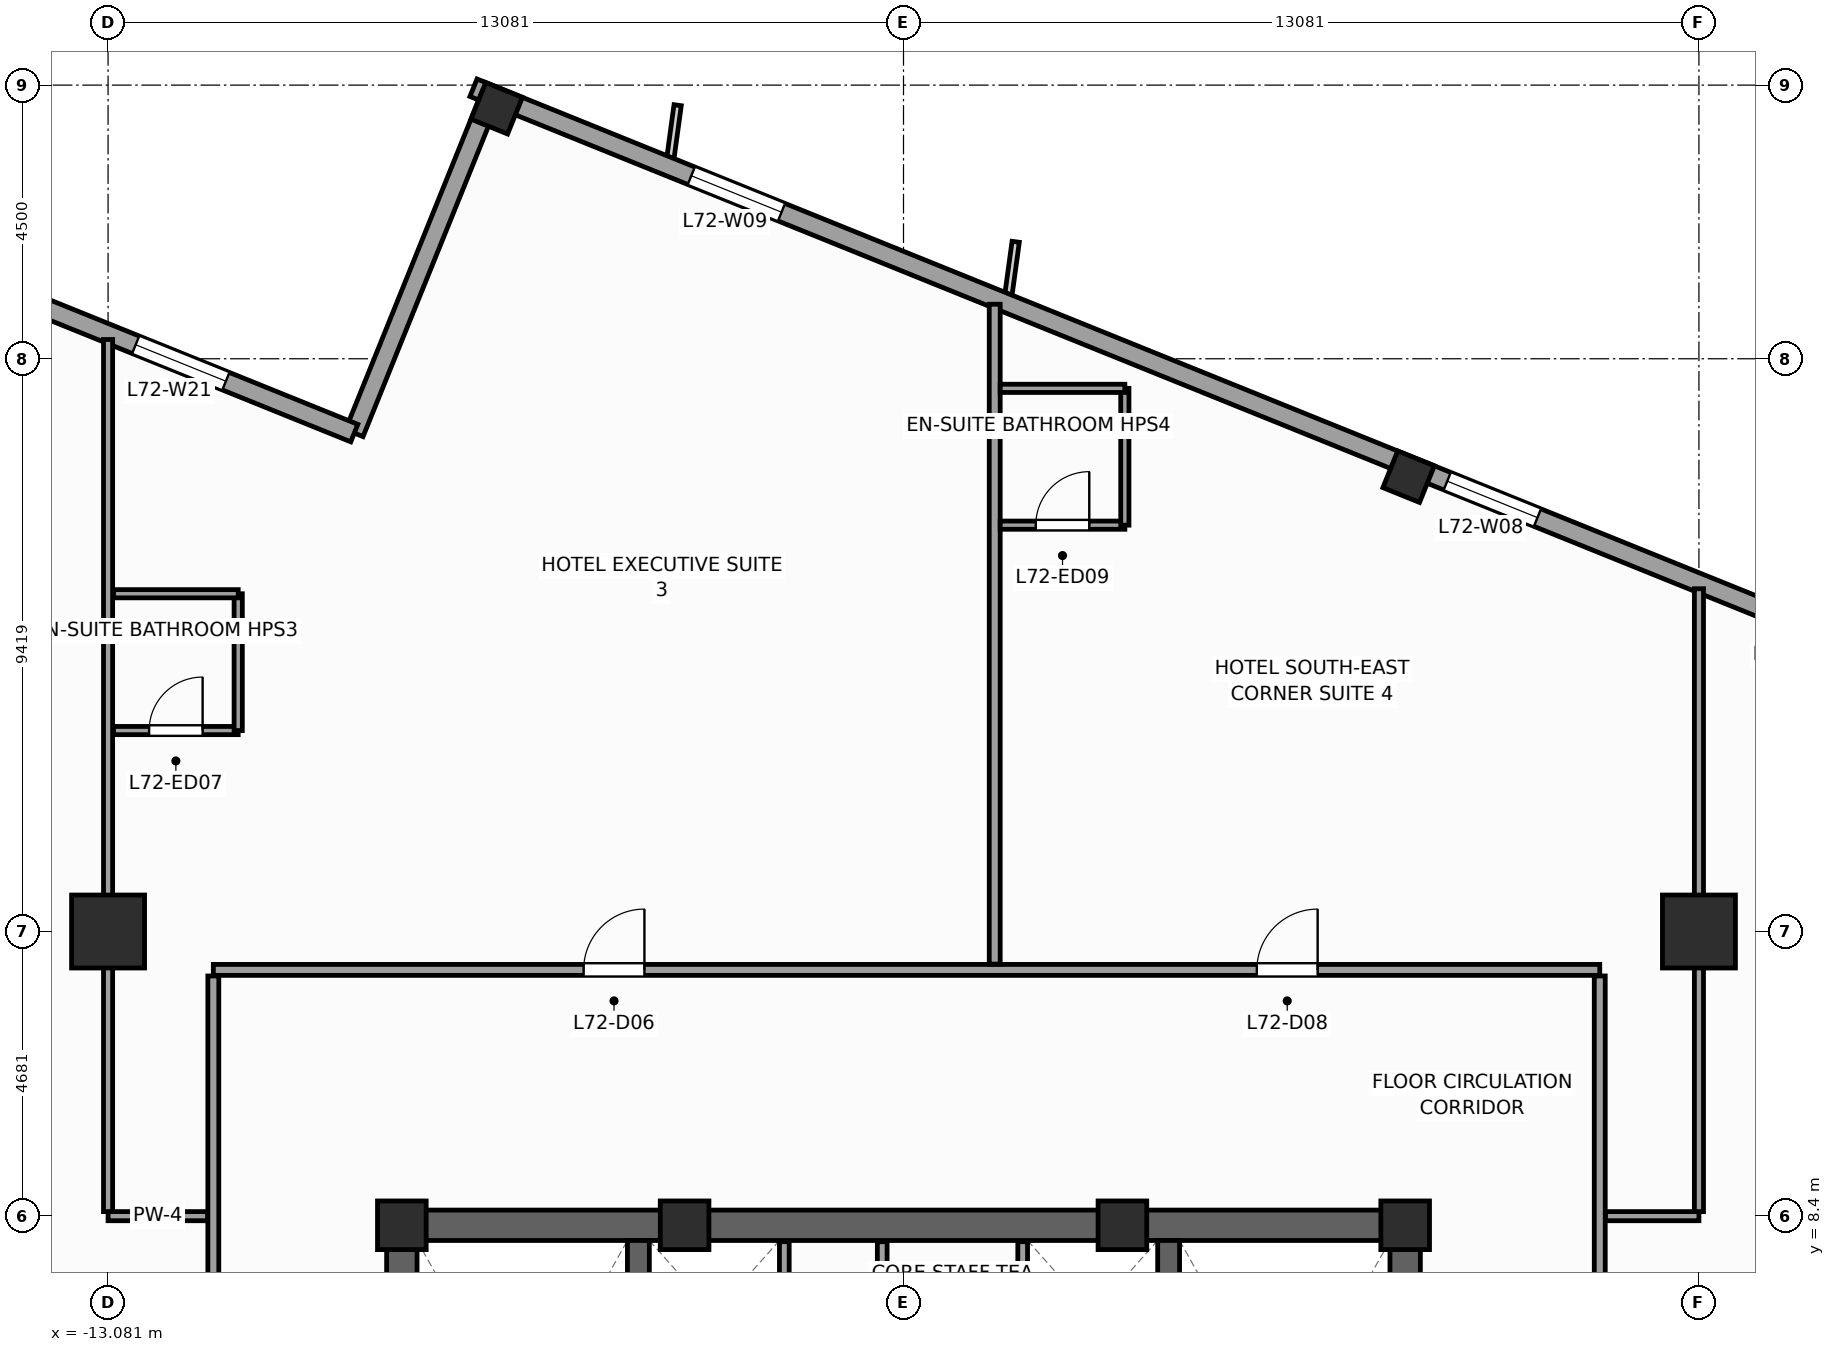
"""IFC4 building model, lengths in metres.
Left out: names, types, materials, properties, quantities, classifications, styles, units other than length and angle.
Written with IfcOpenShell. Run it as: python <this file> out.ifc"""

import sys

from ifc_helpers import new_model, si_unit, direction, frame, frame_2d, origin, origin_2d, place, context, subcontext, project, spatial, rectangle, extrude, source, transform, mapped, element, fill, save


model = new_model("IFC4")
c1 = context("Model", 3, precision=1e-05, world=origin(), true_north=direction((0.0, 1.0)))
c2 = subcontext(c1, "Body", "Model", "MODEL_VIEW")
j1 = project(units=[si_unit("LENGTHUNIT", "METRE"), si_unit("PLANEANGLEUNIT", "RADIAN")], contexts=[c1])
p1 = place(None, origin())
s1 = spatial("IfcSite", under=j1, at=p1, CompositionType="ELEMENT")
p2 = place(p1, origin())
s2 = spatial("IfcBuilding", under=s1, at=p2, CompositionType="ELEMENT")
p3 = place(p2, frame((0.0, 0.0, 294.0)))
s3 = spatial("IfcBuildingStorey", under=s2, at=p3, CompositionType="ELEMENT", Elevation=294.0)
p4 = place(p3, frame((-8.5, 8.25, 0.0), z_axis=(0.0, 0.0, 1.0), x_axis=(1.0, 0.0, 0.0)))
e1 = element("IfcWall", 1, at=p4, inside=s3, PredefinedType="SHEAR", context=c2, shape_type="SweptSolid", body=[
    extrude(rectangle(XDim=17.0, YDim=0.5, at=frame_2d((8.5, 0.0))), origin(), (0.0, 0.0, 1.0), 3.6),
])
p5 = place(p3, frame((-8.25, -8.0, 0.0), z_axis=(0.0, 0.0, 1.0), x_axis=(0.0, 1.0, 0.0)))
e2 = element("IfcWall", 2, at=p5, inside=s3, PredefinedType="SHEAR", context=c2, shape_type="SweptSolid", body=[
    extrude(rectangle(XDim=16.0, YDim=0.5, at=frame_2d((8.0, 0.0))), origin(), (0.0, 0.0, 1.0), 3.6),
])
p6 = place(p5, frame((4.69, 0.0, 0.0)))
e3 = element("IfcOpeningElement", 3, at=p6, cuts=e2, PredefinedType="OPENING", context=c2, shape_type="SweptSolid", body=[
    extrude(rectangle(XDim=1.3, YDim=2.2, at=frame_2d((0.65, 1.1))), frame((0.0, 0.26, 0.0), z_axis=(0.0, -1.0, 0.0), x_axis=(1.0, 0.0, 0.0)), (0.0, 0.0, 1.0), 0.52),
])
p7 = place(p3, frame((8.25, -8.0, 0.0), z_axis=(0.0, 0.0, 1.0), x_axis=(0.0, 1.0, 0.0)))
e4 = element("IfcWall", 4, at=p7, inside=s3, PredefinedType="SHEAR", context=c2, shape_type="SweptSolid", body=[
    extrude(rectangle(XDim=16.0, YDim=0.5, at=frame_2d((8.0, 0.0))), origin(), (0.0, 0.0, 1.0), 3.6),
])
p8 = place(p7, frame((4.69, 0.0, 0.0)))
e5 = element("IfcOpeningElement", 5, at=p8, cuts=e4, PredefinedType="OPENING", context=c2, shape_type="SweptSolid", body=[
    extrude(rectangle(XDim=1.3, YDim=2.2, at=frame_2d((0.65, 1.1))), frame((0.0, 0.26, 0.0), z_axis=(0.0, -1.0, 0.0), x_axis=(1.0, 0.0, 0.0)), (0.0, 0.0, 1.0), 0.52),
])
for number, where, z_axis, x_axis in (
    (6, (-4.36, -8.0, 0.0), (0.0, 0.0, 1.0), (0.0, 1.0, 0.0)),
    (7, (4.36, -8.0, 0.0), (0.0, 0.0, 1.0), (0.0, 1.0, 0.0)),
):
    element("IfcWall", number, at=place(p3, frame(where, z_axis=z_axis, x_axis=x_axis)), inside=s3, PredefinedType="SHEAR", context=c2, shape_type="SweptSolid", body=[
        extrude(rectangle(XDim=16.0, YDim=0.36, at=frame_2d((8.0, 0.0))), origin(), (0.0, 0.0, 1.0), 3.6),
    ])
m1 = source(origin(), c2, "Body", "SweptSolid", [
    extrude(rectangle(XDim=0.8, YDim=0.8, at=origin_2d()), origin(), (0.0, 0.0, 1.0), 3.6),
])
for number, where, z_axis, x_axis in (
    (8, (8.25, 8.25, 0.0), (0.0, 0.0, 1.0), (1.0, 0.0, 0.0)),
    (9, (-8.25, 8.25, 0.0), (0.0, 0.0, 1.0), (1.0, 0.0, 0.0)),
    (10, (-3.6, 8.25, 0.0), (0.0, 0.0, 1.0), (1.0, 0.0, 0.0)),
    (11, (3.6, 8.25, 0.0), (0.0, 0.0, 1.0), (1.0, 0.0, 0.0)),
):
    element("IfcColumn", number, at=place(p3, frame(where, z_axis=z_axis, x_axis=x_axis)), inside=s3, PredefinedType="PILASTER", context=c2, shape_type="MappedRepresentation", body=[
        mapped(m1, transform((0.0, 0.0, 0.0), scale=1.0)),
    ])
m2 = source(origin(), c2, "Body", "SweptSolid", [
    extrude(rectangle(XDim=1.2, YDim=1.2, at=origin_2d()), origin(), (0.0, 0.0, 1.0), 3.6),
])
for number, where, z_axis, x_axis in (
    (12, (13.081, 13.081, 0.0), (0.0, 0.0, 1.0), (1.0, 0.0, 0.0)),
    (13, (-13.081, 13.081, 0.0), (0.0, 0.0, 1.0), (1.0, 0.0, 0.0)),
):
    element("IfcColumn", number, at=place(p3, frame(where, z_axis=z_axis, x_axis=x_axis)), inside=s3, PredefinedType="COLUMN", context=c2, shape_type="MappedRepresentation", body=[
        mapped(m2, transform((0.0, 0.0, 0.0), scale=1.0)),
    ])
m3 = source(origin(), c2, "Body", "SweptSolid", [
    extrude(rectangle(XDim=0.65, YDim=0.65, at=origin_2d()), origin(), (0.0, 0.0, 1.0), 3.6),
])
for number, where, z_axis, x_axis in (
    (14, (8.307, 20.56, 0.0), (0.0, 0.0, 1.0), (0.375, 0.927, 0.0)),
    (15, (-6.69, 26.62, 0.0), (0.0, 0.0, 1.0), (0.375, 0.927, 0.0)),
):
    element("IfcColumn", number, at=place(p3, frame(where, z_axis=z_axis, x_axis=x_axis)), inside=s3, PredefinedType="COLUMN", context=c2, shape_type="MappedRepresentation", body=[
        mapped(m3, transform((0.0, 0.0, 0.0), scale=1.0)),
    ])
p9 = place(p3, frame((23.813, 14.479, 0.0), z_axis=(0.0, 0.0, 1.0), x_axis=(-0.927182657188, 0.374609557019, 0.0)))
e16 = element("IfcWall", 16, at=p9, inside=s3, PredefinedType="STANDARD", context=c2, shape_type="SweptSolid", body=[
    extrude(rectangle(XDim=33.31, YDim=0.31, at=frame_2d((16.655, 0.0))), origin(), (0.0, 0.0, 1.0), 2.75),
])
p10 = place(p9, frame((3.197, 0.0, 0.47)))
e17 = element("IfcOpeningElement", 17, at=p10, cuts=e16, PredefinedType="OPENING", context=c2, shape_type="SweptSolid", body=[
    extrude(rectangle(XDim=1.6, YDim=2.1, at=frame_2d((0.8, 1.05))), frame((0.0, 0.165, 0.0), z_axis=(0.0, -1.0, 0.0), x_axis=(1.0, 0.0, 0.0)), (0.0, 0.0, 1.0), 0.33),
])
p11 = place(p9, frame((8.86, 0.0, 0.47)))
e18 = element("IfcOpeningElement", 18, at=p11, cuts=e16, PredefinedType="OPENING", context=c2, shape_type="SweptSolid", body=[
    extrude(rectangle(XDim=1.6, YDim=2.1, at=frame_2d((0.8, 1.05))), frame((0.0, 0.165, 0.0), z_axis=(0.0, -1.0, 0.0), x_axis=(1.0, 0.0, 0.0)), (0.0, 0.0, 1.0), 0.33),
])
p12 = place(p9, frame((14.439, 0.0, 0.47)))
e19 = element("IfcOpeningElement", 19, at=p12, cuts=e16, PredefinedType="OPENING", context=c2, shape_type="SweptSolid", body=[
    extrude(rectangle(XDim=1.6, YDim=2.1, at=frame_2d((0.8, 1.05))), frame((0.0, 0.165, 0.0), z_axis=(0.0, -1.0, 0.0), x_axis=(1.0, 0.0, 0.0)), (0.0, 0.0, 1.0), 0.33),
])
p13 = place(p9, frame((27.847, 0.0, 0.47)))
e20 = element("IfcOpeningElement", 20, at=p13, cuts=e16, PredefinedType="OPENING", context=c2, shape_type="SweptSolid", body=[
    extrude(rectangle(XDim=1.6, YDim=2.1, at=frame_2d((0.8, 1.05))), frame((0.0, 0.165, 0.0), z_axis=(0.0, -1.0, 0.0), x_axis=(1.0, 0.0, 0.0)), (0.0, 0.0, 1.0), 0.33),
])
p14 = place(p3, frame((-6.784, 26.841, 0.0), z_axis=(0.0, 0.0, 1.0), x_axis=(-0.374636620962, -0.927171722085, 0.0)))
e21 = element("IfcWall", 21, at=p14, inside=s3, PredefinedType="STANDARD", context=c2, shape_type="SweptSolid", body=[
    extrude(rectangle(XDim=6.0, YDim=0.31, at=frame_2d((3.0, 0.0))), origin(), (0.0, 0.0, 1.0), 2.65),
])
p15 = place(p3, frame((-9.032, 21.278, 0.0), z_axis=(0.0, 0.0, 1.0), x_axis=(-0.927185411764, 0.374602739196, 0.0)))
e22 = element("IfcWall", 22, at=p15, inside=s3, PredefinedType="STANDARD", context=c2, shape_type="SweptSolid", body=[
    extrude(rectangle(XDim=6.155, YDim=0.31, at=frame_2d((3.078, 0.0))), origin(), (0.0, 0.0, 1.0), 3.35),
])
p16 = place(p15, frame((2.278, 0.0, 0.47)))
e23 = element("IfcOpeningElement", 23, at=p16, cuts=e22, PredefinedType="OPENING", context=c2, shape_type="SweptSolid", body=[
    extrude(rectangle(XDim=1.6, YDim=2.1, at=frame_2d((0.8, 1.05))), frame((0.0, 0.165, 0.0), z_axis=(0.0, -1.0, 0.0), x_axis=(1.0, 0.0, 0.0)), (0.0, 0.0, 1.0), 0.33),
])
for number, where, z_axis, x_axis in (
    (24, (-1.96, 4.58, 0.0), (0.0, 0.0, 1.0), (0.0, 1.0, 0.0)),
    (25, (1.96, 4.58, 0.0), (0.0, 0.0, 1.0), (0.0, 1.0, 0.0)),
):
    element("IfcWall", number, at=place(p3, frame(where, z_axis=z_axis, x_axis=x_axis)), inside=s3, PredefinedType="PARTITIONING", context=c2, shape_type="SweptSolid", body=[
        extrude(rectangle(XDim=3.4, YDim=0.16, at=frame_2d((1.7, 0.0))), origin(), (0.0, 0.0, 1.0), 3.35),
    ])
p17 = place(p3, frame((-0.35, 4.6, 0.0), z_axis=(0.0, 0.0, 1.0), x_axis=(0.0, 1.0, 0.0)))
e26 = element("IfcWall", 26, at=p17, inside=s3, PredefinedType="PARTITIONING", context=c2, shape_type="SweptSolid", body=[
    extrude(rectangle(XDim=3.38, YDim=0.16, at=frame_2d((1.69, 0.0))), origin(), (0.0, 0.0, 1.0), 3.35),
])
p18 = place(p3, frame((-11.35, 12.45, 0.0), z_axis=(0.0, 0.0, 1.0), x_axis=(1.0, 0.0, 0.0)))
e27 = element("IfcWall", 27, at=p18, inside=s3, PredefinedType="PARTITIONING", context=c2, shape_type="SweptSolid", body=[
    extrude(rectangle(XDim=22.8, YDim=0.18, at=frame_2d((11.4, 0.0))), origin(), (0.0, 0.0, 1.0), 3.35),
])
p19 = place(p18, frame((6.089, 0.0, 0.0)))
e28 = element("IfcOpeningElement", 28, at=p19, cuts=e27, PredefinedType="OPENING", context=c2, shape_type="SweptSolid", body=[
    extrude(rectangle(XDim=1.0, YDim=2.15, at=frame_2d((0.5, 1.075))), frame((0.0, 0.1, 0.0), z_axis=(0.0, -1.0, 0.0), x_axis=(1.0, 0.0, 0.0)), (0.0, 0.0, 1.0), 0.2),
])
p20 = place(p18, frame((17.161, 0.0, 0.0)))
e29 = element("IfcOpeningElement", 29, at=p20, cuts=e27, PredefinedType="OPENING", context=c2, shape_type="SweptSolid", body=[
    extrude(rectangle(XDim=1.0, YDim=2.15, at=frame_2d((0.5, 1.075))), frame((0.0, 0.1, 0.0), z_axis=(0.0, -1.0, 0.0), x_axis=(1.0, 0.0, 0.0)), (0.0, 0.0, 1.0), 0.2),
])
p21 = place(p3, frame((-11.35, -10.2, 0.0), z_axis=(0.0, 0.0, 1.0), x_axis=(0.0, 1.0, 0.0)))
e30 = element("IfcWall", 30, at=p21, inside=s3, PredefinedType="PARTITIONING", context=c2, shape_type="SweptSolid", body=[
    extrude(rectangle(XDim=22.55, YDim=0.18, at=frame_2d((11.275, 0.0))), origin(), (0.0, 0.0, 1.0), 3.35),
])
p22 = place(p21, frame((11.6, 0.0, 0.0)))
e31 = element("IfcOpeningElement", 31, at=p22, cuts=e30, PredefinedType="OPENING", context=c2, shape_type="SweptSolid", body=[
    extrude(rectangle(XDim=1.0, YDim=2.15, at=frame_2d((0.5, 1.075))), frame((0.0, 0.1, 0.0), z_axis=(0.0, -1.0, 0.0), x_axis=(1.0, 0.0, 0.0)), (0.0, 0.0, 1.0), 0.2),
])
p23 = place(p21, frame((15.8, 0.0, 0.0)))
e32 = element("IfcOpeningElement", 32, at=p23, cuts=e30, PredefinedType="OPENING", context=c2, shape_type="SweptSolid", body=[
    extrude(rectangle(XDim=1.0, YDim=2.15, at=frame_2d((0.5, 1.075))), frame((0.0, 0.1, 0.0), z_axis=(0.0, -1.0, 0.0), x_axis=(1.0, 0.0, 0.0)), (0.0, 0.0, 1.0), 0.2),
])
p24 = place(p21, frame((3.6, 0.0, 0.0)))
e33 = element("IfcOpeningElement", 33, at=p24, cuts=e30, PredefinedType="OPENING", context=c2, shape_type="SweptSolid", body=[
    extrude(rectangle(XDim=1.0, YDim=2.15, at=frame_2d((0.5, 1.075))), frame((0.0, 0.1, 0.0), z_axis=(0.0, -1.0, 0.0), x_axis=(1.0, 0.0, 0.0)), (0.0, 0.0, 1.0), 0.2),
])
p25 = place(p21, frame((7.8, 0.0, 0.0)))
e34 = element("IfcOpeningElement", 34, at=p25, cuts=e30, PredefinedType="OPENING", context=c2, shape_type="SweptSolid", body=[
    extrude(rectangle(XDim=1.0, YDim=2.15, at=frame_2d((0.5, 1.075))), frame((0.0, 0.1, 0.0), z_axis=(0.0, -1.0, 0.0), x_axis=(1.0, 0.0, 0.0)), (0.0, 0.0, 1.0), 0.2),
])
p26 = place(p3, frame((11.45, -10.2, 0.0), z_axis=(0.0, 0.0, 1.0), x_axis=(0.0, 1.0, 0.0)))
e35 = element("IfcWall", 35, at=p26, inside=s3, PredefinedType="PARTITIONING", context=c2, shape_type="SweptSolid", body=[
    extrude(rectangle(XDim=22.55, YDim=0.18, at=frame_2d((11.275, 0.0))), origin(), (0.0, 0.0, 1.0), 3.35),
])
p27 = place(p26, frame((13.9, 0.0, 0.0)))
e36 = element("IfcOpeningElement", 36, at=p27, cuts=e35, PredefinedType="OPENING", context=c2, shape_type="SweptSolid", body=[
    extrude(rectangle(XDim=1.0, YDim=2.15, at=frame_2d((0.5, 1.075))), frame((0.0, 0.1, 0.0), z_axis=(0.0, -1.0, 0.0), x_axis=(1.0, 0.0, 0.0)), (0.0, 0.0, 1.0), 0.2),
])
p28 = place(p26, frame((5.5, 0.0, 0.0)))
e37 = element("IfcOpeningElement", 37, at=p28, cuts=e35, PredefinedType="OPENING", context=c2, shape_type="SweptSolid", body=[
    extrude(rectangle(XDim=1.0, YDim=2.15, at=frame_2d((0.5, 1.075))), frame((0.0, 0.1, 0.0), z_axis=(0.0, -1.0, 0.0), x_axis=(1.0, 0.0, 0.0)), (0.0, 0.0, 1.0), 0.2),
])
p29 = place(p3, frame((1.5, 12.545, 0.0), z_axis=(0.0, 0.0, 1.0), x_axis=(0.0, 1.0, 0.0)))
e38 = element("IfcWall", 38, at=p29, inside=s3, PredefinedType="PARTITIONING", context=c2, shape_type="SweptSolid", body=[
    extrude(rectangle(XDim=10.852, YDim=0.18, at=frame_2d((5.426, 0.0))), origin(), (0.0, 0.0, 1.0), 3.35),
])
p30 = place(p3, frame((-11.445, 8.4, 0.0), z_axis=(0.0, 0.0, 1.0), x_axis=(-1.0, 0.0, 0.0)))
e39 = element("IfcWall", 39, at=p30, inside=s3, PredefinedType="PARTITIONING", context=c2, shape_type="SweptSolid", body=[
    extrude(rectangle(XDim=1.636, YDim=0.15, at=frame_2d((0.818, 0.0))), origin(), (0.0, 0.0, 1.0), 3.35),
])
p31 = place(p3, frame((-13.081, 8.475, 0.0), z_axis=(0.0, 0.0, 1.0), x_axis=(0.0, 1.0, 0.0)))
e40 = element("IfcWall", 40, at=p31, inside=s3, PredefinedType="PARTITIONING", context=c2, shape_type="SweptSolid", body=[
    extrude(rectangle(XDim=14.342, YDim=0.15, at=frame_2d((7.171, 0.0))), origin(), (0.0, 0.0, 1.0), 2.45),
])
p32 = place(p3, frame((11.545, 8.4, 0.0), z_axis=(0.0, 0.0, 1.0), x_axis=(1.0, 0.0, 0.0)))
e41 = element("IfcWall", 41, at=p32, inside=s3, PredefinedType="PARTITIONING", context=c2, shape_type="SweptSolid", body=[
    extrude(rectangle(XDim=1.536, YDim=0.15, at=frame_2d((0.768, 0.0))), origin(), (0.0, 0.0, 1.0), 3.35),
])
p33 = place(p3, frame((13.081, 8.475, 0.0), z_axis=(0.0, 0.0, 1.0), x_axis=(0.0, 1.0, 0.0)))
e42 = element("IfcWall", 42, at=p33, inside=s3, PredefinedType="PARTITIONING", context=c2, shape_type="SweptSolid", body=[
    extrude(rectangle(XDim=10.243, YDim=0.15, at=frame_2d((5.121, 0.0))), origin(), (0.0, 0.0, 1.0), 2.45),
])
p34 = place(p3, frame((-12.991, 16.386, 0.0), z_axis=(0.0, 0.0, 1.0), x_axis=(1.0, 0.0, 0.0)))
e43 = element("IfcWall", 43, at=p34, inside=s3, PredefinedType="PARTITIONING", context=c2, shape_type="SweptSolid", body=[
    extrude(rectangle(XDim=2.05, YDim=0.135, at=frame_2d((1.025, 0.0))), origin(), (0.0, 0.0, 1.0), 3.35),
])
p35 = place(p34, frame((0.585, 0.0, 0.0)))
e44 = element("IfcOpeningElement", 44, at=p35, cuts=e43, PredefinedType="OPENING", context=c2, shape_type="SweptSolid", body=[
    extrude(rectangle(XDim=0.88, YDim=2.1, at=frame_2d((0.44, 1.05))), frame((0.0, 0.078, 0.0), z_axis=(0.0, -1.0, 0.0), x_axis=(1.0, 0.0, 0.0)), (0.0, 0.0, 1.0), 0.155),
])
p36 = place(p3, frame((-10.941, 16.386, 0.0), z_axis=(0.0, 0.0, 1.0), x_axis=(0.0, 1.0, 0.0)))
e45 = element("IfcWall", 45, at=p36, inside=s3, PredefinedType="PARTITIONING", context=c2, shape_type="SweptSolid", body=[
    extrude(rectangle(XDim=2.25, YDim=0.135, at=frame_2d((1.125, 0.0))), origin(), (0.0, 0.0, 1.0), 3.35),
])
p37 = place(p3, frame((-12.991, 18.636, 0.0), z_axis=(0.0, 0.0, 1.0), x_axis=(1.0, 0.0, 0.0)))
e46 = element("IfcWall", 46, at=p37, inside=s3, PredefinedType="PARTITIONING", context=c2, shape_type="SweptSolid", body=[
    extrude(rectangle(XDim=2.05, YDim=0.135, at=frame_2d((1.025, 0.0))), origin(), (0.0, 0.0, 1.0), 3.35),
])
p38 = place(p3, frame((1.59, 19.763, 0.0), z_axis=(0.0, 0.0, 1.0), x_axis=(1.0, 0.0, 0.0)))
e47 = element("IfcWall", 47, at=p38, inside=s3, PredefinedType="PARTITIONING", context=c2, shape_type="SweptSolid", body=[
    extrude(rectangle(XDim=2.05, YDim=0.135, at=frame_2d((1.025, 0.0))), origin(), (0.0, 0.0, 1.0), 3.35),
])
p39 = place(p38, frame((0.585, 0.0, 0.0)))
e48 = element("IfcOpeningElement", 48, at=p39, cuts=e47, PredefinedType="OPENING", context=c2, shape_type="SweptSolid", body=[
    extrude(rectangle(XDim=0.88, YDim=2.1, at=frame_2d((0.44, 1.05))), frame((0.0, 0.078, 0.0), z_axis=(0.0, -1.0, 0.0), x_axis=(1.0, 0.0, 0.0)), (0.0, 0.0, 1.0), 0.155),
])
p40 = place(p3, frame((3.64, 19.763, 0.0), z_axis=(0.0, 0.0, 1.0), x_axis=(0.0, 1.0, 0.0)))
e49 = element("IfcWall", 49, at=p40, inside=s3, PredefinedType="PARTITIONING", context=c2, shape_type="SweptSolid", body=[
    extrude(rectangle(XDim=2.25, YDim=0.135, at=frame_2d((1.125, 0.0))), origin(), (0.0, 0.0, 1.0), 3.35),
])
p41 = place(p3, frame((1.59, 22.013, 0.0), z_axis=(0.0, 0.0, 1.0), x_axis=(1.0, 0.0, 0.0)))
e50 = element("IfcWall", 50, at=p41, inside=s3, PredefinedType="PARTITIONING", context=c2, shape_type="SweptSolid", body=[
    extrude(rectangle(XDim=2.05, YDim=0.135, at=frame_2d((1.025, 0.0))), origin(), (0.0, 0.0, 1.0), 3.35),
])
m4 = source(origin(), c2, "Body", "SweptSolid", [
    extrude(rectangle(XDim=1.6, YDim=2.1, at=frame_2d((0.8, 1.05))), frame((0.0, 0.03, 0.0), z_axis=(0.0, -1.0, 0.0), x_axis=(1.0, 0.0, 0.0)), (0.0, 0.0, 1.0), 0.06),
])
p42 = place(p12, origin())
e51 = element("IfcWindow", 51, at=p42, inside=s3, PartitioningType="SINGLE_PANEL", PredefinedType="WINDOW", context=c2, shape_type="MappedRepresentation", body=[
    mapped(m4, transform((0.0, 0.0, 0.0), scale=1.0)),
])
fill(e19, e51)
p43 = place(p13, origin())
e52 = element("IfcWindow", 52, at=p43, inside=s3, PartitioningType="SINGLE_PANEL", PredefinedType="WINDOW", context=c2, shape_type="MappedRepresentation", body=[
    mapped(m4, transform((0.0, 0.0, 0.0), scale=1.0)),
])
fill(e20, e52)
p44 = place(p16, origin())
e53 = element("IfcWindow", 53, at=p44, inside=s3, PartitioningType="SINGLE_PANEL", PredefinedType="WINDOW", context=c2, shape_type="MappedRepresentation", body=[
    mapped(m4, transform((0.0, 0.0, 0.0), scale=1.0)),
])
fill(e23, e53)
m5 = source(origin(), c2, "Body", "SweptSolid", [
    extrude(rectangle(XDim=1.0, YDim=2.15, at=frame_2d((0.5, 1.075))), frame((0.0, 0.025, 0.0), z_axis=(0.0, -1.0, 0.0), x_axis=(1.0, 0.0, 0.0)), (0.0, 0.0, 1.0), 0.05),
])
p45 = place(p19, origin())
e54 = element("IfcDoor", 54, at=p45, inside=s3, OperationType="SINGLE_SWING_RIGHT", PredefinedType="DOOR", context=c2, shape_type="MappedRepresentation", body=[
    mapped(m5, transform((0.0, 0.0, 0.0), scale=1.0)),
])
fill(e28, e54)
m6 = source(origin(), c2, "Body", "SweptSolid", [
    extrude(rectangle(XDim=0.88, YDim=2.1, at=frame_2d((0.44, 1.05))), frame((0.0, 0.025, 0.0), z_axis=(0.0, -1.0, 0.0), x_axis=(1.0, 0.0, 0.0)), (0.0, 0.0, 1.0), 0.05),
])
p46 = place(p35, origin())
e55 = element("IfcDoor", 55, at=p46, inside=s3, OperationType="SINGLE_SWING_RIGHT", PredefinedType="DOOR", context=c2, shape_type="MappedRepresentation", body=[
    mapped(m6, transform((0.0, 0.0, 0.0), scale=1.0)),
])
fill(e44, e55)
p47 = place(p20, origin())
e56 = element("IfcDoor", 56, at=p47, inside=s3, OperationType="SINGLE_SWING_RIGHT", PredefinedType="DOOR", context=c2, shape_type="MappedRepresentation", body=[
    mapped(m5, transform((0.0, 0.0, 0.0), scale=1.0)),
])
fill(e29, e56)
p48 = place(p39, origin())
e57 = element("IfcDoor", 57, at=p48, inside=s3, OperationType="SINGLE_SWING_RIGHT", PredefinedType="DOOR", context=c2, shape_type="MappedRepresentation", body=[
    mapped(m6, transform((0.0, 0.0, 0.0), scale=1.0)),
])
fill(e48, e57)
save(model, sys.argv[1])
